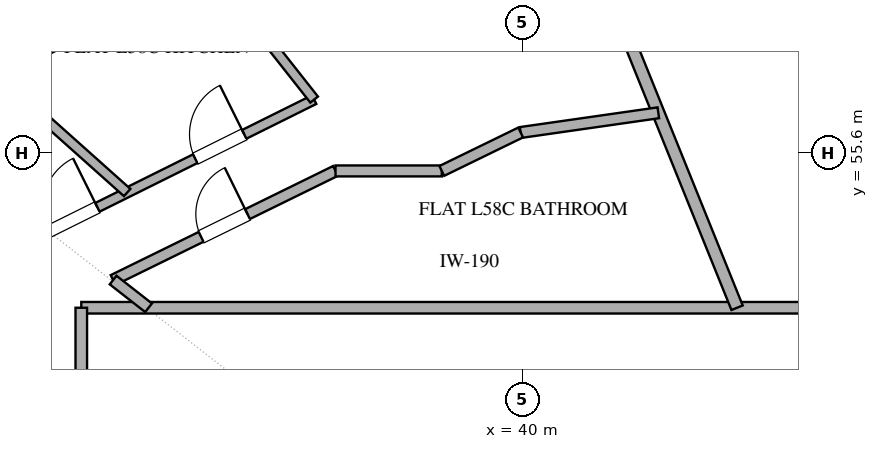
"""IFC4 building model, lengths in metres.
Left out: names, types, materials, properties, quantities, classifications, styles, units other than length and angle.
Written with IfcOpenShell. Run it as: python <this file> out.ifc"""

import sys

from ifc_helpers import new_model, si_unit, direction, frame, frame_2d, origin, place, context, subcontext, project, spatial, rectangle, extrude, element, fill, save


model = new_model("IFC4")
c1 = context("Model", 3, precision=1e-05, world=origin(), true_north=direction((0.0, 1.0)))
c2 = subcontext(c1, "Body", "Model", "MODEL_VIEW")
j1 = project(units=[si_unit("LENGTHUNIT", "METRE"), si_unit("PLANEANGLEUNIT", "RADIAN")], contexts=[c1])
p1 = place(None, origin())
s1 = spatial("IfcSite", under=j1, at=p1, CompositionType="ELEMENT")
p2 = place(p1, origin())
s2 = spatial("IfcBuilding", under=s1, at=p2, CompositionType="ELEMENT")
p3 = place(p2, frame((0.0, 0.0, 228.0)))
s3 = spatial("IfcBuildingStorey", under=s2, at=p3, CompositionType="ELEMENT", Elevation=228.0)
p4 = place(p3, frame((32.75, 53.05, 0.0), z_axis=(0.0, 0.0, 1.0), x_axis=(1.0, 0.0, 0.0)))
e1 = element("IfcWall", 1, at=p4, inside=s3, PredefinedType="PARTITIONING", context=c2, shape_type="SweptSolid", body=[
    extrude(rectangle(XDim=12.766, YDim=0.19, at=frame_2d((6.383, 0.0))), origin(), (0.0, 0.0, 1.0), 2.72),
])
p5 = place(p3, frame((32.75, 42.243, 0.0), z_axis=(0.0, 0.0, 1.0), x_axis=(0.0, 1.0, 0.0)))
e2 = element("IfcWall", 2, at=p5, inside=s3, PredefinedType="PARTITIONING", context=c2, shape_type="SweptSolid", body=[
    extrude(rectangle(XDim=10.807, YDim=0.19, at=frame_2d((5.404, 0.0))), origin(), (0.0, 0.0, 1.0), 2.72),
])
p6 = place(p5, frame((5.837, 0.0, 0.0)))
e3 = element("IfcOpeningElement", 3, at=p6, cuts=e2, PredefinedType="OPENING", context=c2, shape_type="SweptSolid", body=[
    extrude(rectangle(XDim=1.0, YDim=2.2, at=frame_2d((0.5, 1.1))), frame((0.0, 0.105, 0.0), z_axis=(0.0, -1.0, 0.0), x_axis=(1.0, 0.0, 0.0)), (0.0, 0.0, 1.0), 0.21),
])
p7 = place(p3, frame((33.273, 53.506, 0.0), z_axis=(0.0, 0.0, 1.0), x_axis=(0.89778136281, 0.440441397454, 0.0)))
e4 = element("IfcWall", 4, at=p7, inside=s3, PredefinedType="PLUMBINGWALL", context=c2, shape_type="SweptSolid", body=[
    extrude(rectangle(XDim=4.074, YDim=0.18, at=frame_2d((2.037, 0.0))), origin(), (0.0, 0.0, 1.0), 2.72),
])
p8 = place(p7, frame((1.612, 0.0, 0.0)))
e5 = element("IfcOpeningElement", 5, at=p8, cuts=e4, PredefinedType="OPENING", context=c2, shape_type="SweptSolid", body=[
    extrude(rectangle(XDim=0.85, YDim=2.1, at=frame_2d((0.425, 1.05))), frame((0.0, 0.1, 0.0), z_axis=(0.0, -1.0, 0.0), x_axis=(1.0, 0.0, 0.0)), (0.0, 0.0, 1.0), 0.2),
])
p9 = place(p3, frame((31.689, 54.042, 0.0), z_axis=(0.0, 0.0, 1.0), x_axis=(0.895479575413, 0.445102606168, 0.0)))
e6 = element("IfcWall", 6, at=p9, inside=s3, PredefinedType="PLUMBINGWALL", context=c2, shape_type="SweptSolid", body=[
    extrude(rectangle(XDim=5.462, YDim=0.16, at=frame_2d((2.731, 0.0))), origin(), (0.0, 0.0, 1.0), 2.72),
])
p10 = place(p9, frame((3.278, 0.0, 0.0)))
e7 = element("IfcOpeningElement", 7, at=p10, cuts=e6, PredefinedType="OPENING", context=c2, shape_type="SweptSolid", body=[
    extrude(rectangle(XDim=0.9, YDim=2.1, at=frame_2d((0.45, 1.05))), frame((0.0, 0.09, 0.0), z_axis=(0.0, -1.0, 0.0), x_axis=(1.0, 0.0, 0.0)), (0.0, 0.0, 1.0), 0.18),
])
p11 = place(p9, frame((0.581, 0.0, 0.0)))
e8 = element("IfcOpeningElement", 8, at=p11, cuts=e6, PredefinedType="OPENING", context=c2, shape_type="SweptSolid", body=[
    extrude(rectangle(XDim=0.9, YDim=2.1, at=frame_2d((0.45, 1.05))), frame((0.0, 0.09, 0.0), z_axis=(0.0, -1.0, 0.0), x_axis=(1.0, 0.0, 0.0)), (0.0, 0.0, 1.0), 0.18),
])
p12 = place(p3, frame((41.674, 57.657, 0.0), z_axis=(0.0, 0.0, 1.0), x_axis=(0.374573524941, -0.927197214412, 0.0)))
e9 = element("IfcWall", 9, at=p12, inside=s3, PredefinedType="PARTITIONING", context=c2, shape_type="SweptSolid", body=[
    extrude(rectangle(XDim=4.969, YDim=0.2, at=frame_2d((2.485, 0.0))), origin(), (0.0, 0.0, 1.0), 2.72),
])
p13 = place(p3, frame((33.505, 54.945, 0.0), z_axis=(0.0, 0.0, 1.0), x_axis=(-0.745914664094, 0.66604152565, 0.0)))
e10 = element("IfcWall", 10, at=p13, inside=s3, PredefinedType="PLUMBINGWALL", context=c2, shape_type="SweptSolid", body=[
    extrude(rectangle(XDim=3.014, YDim=0.16, at=frame_2d((1.507, 0.0))), origin(), (0.0, 0.0, 1.0), 2.72),
])
p14 = place(p3, frame((36.58, 56.473, 0.0), z_axis=(0.0, 0.0, 1.0), x_axis=(-0.619378047354, 0.785092882694, 0.0)))
e11 = element("IfcWall", 11, at=p14, inside=s3, PredefinedType="PLUMBINGWALL", context=c2, shape_type="SweptSolid", body=[
    extrude(rectangle(XDim=2.914, YDim=0.16, at=frame_2d((1.457, 0.0))), origin(), (0.0, 0.0, 1.0), 2.72),
])
p15 = place(p3, frame((39.976, 55.932, 0.0), z_axis=(0.0, 0.0, 1.0), x_axis=(0.989917445937, 0.141645509032, 0.0)))
e12 = element("IfcWall", 12, at=p15, inside=s3, PredefinedType="PLUMBINGWALL", context=c2, shape_type="SweptSolid", body=[
    extrude(rectangle(XDim=2.287, YDim=0.18, at=frame_2d((1.144, 0.0))), origin(), (0.0, 0.0, 1.0), 2.72),
])
p16 = place(p3, frame((36.931, 55.3, 0.0), z_axis=(0.0, 0.0, 1.0), x_axis=(1.0, 0.0, 0.0)))
e13 = element("IfcWall", 13, at=p16, inside=s3, PredefinedType="PLUMBINGWALL", context=c2, shape_type="SweptSolid", body=[
    extrude(rectangle(XDim=1.748, YDim=0.18, at=frame_2d((0.874, 0.0))), origin(), (0.0, 0.0, 1.0), 2.72),
])
p17 = place(p3, frame((38.679, 55.3, 0.0), z_axis=(0.0, 0.0, 1.0), x_axis=(0.898916394035, 0.438120207861, 0.0)))
e14 = element("IfcWall", 14, at=p17, inside=s3, PredefinedType="PLUMBINGWALL", context=c2, shape_type="SweptSolid", body=[
    extrude(rectangle(XDim=1.443, YDim=0.18, at=frame_2d((0.721, 0.0))), origin(), (0.0, 0.0, 1.0), 2.72),
])
p18 = place(p3, frame((33.857, 53.05, 0.0), z_axis=(0.0, 0.0, 1.0), x_axis=(-0.788214334349, 0.615400815019, 0.0)))
e15 = element("IfcWall", 15, at=p18, inside=s3, PredefinedType="PLUMBINGWALL", context=c2, shape_type="SweptSolid", body=[
    extrude(rectangle(XDim=0.74, YDim=0.18, at=frame_2d((0.37, 0.0))), origin(), (0.0, 0.0, 1.0), 2.72),
])
p19 = place(p8, origin())
e16 = element("IfcDoor", 16, at=p19, inside=s3, OperationType="SINGLE_SWING_RIGHT", PredefinedType="DOOR", context=c2, shape_type="SweptSolid", body=[
    extrude(rectangle(XDim=0.85, YDim=2.1, at=frame_2d((0.425, 1.05))), frame((0.0, 0.025, 0.0), z_axis=(0.0, -1.0, 0.0), x_axis=(1.0, 0.0, 0.0)), (0.0, 0.0, 1.0), 0.05),
])
fill(e5, e16)
p20 = place(p10, origin())
e17 = element("IfcDoor", 17, at=p20, inside=s3, OperationType="SINGLE_SWING_RIGHT", PredefinedType="DOOR", context=c2, shape_type="SweptSolid", body=[
    extrude(rectangle(XDim=0.9, YDim=2.1, at=frame_2d((0.45, 1.05))), frame((0.0, 0.025, 0.0), z_axis=(0.0, -1.0, 0.0), x_axis=(1.0, 0.0, 0.0)), (0.0, 0.0, 1.0), 0.05),
])
fill(e7, e17)
p21 = place(p11, origin())
e18 = element("IfcDoor", 18, at=p21, inside=s3, OperationType="SINGLE_SWING_RIGHT", PredefinedType="DOOR", context=c2, shape_type="SweptSolid", body=[
    extrude(rectangle(XDim=0.9, YDim=2.1, at=frame_2d((0.45, 1.05))), frame((0.0, 0.025, 0.0), z_axis=(0.0, -1.0, 0.0), x_axis=(1.0, 0.0, 0.0)), (0.0, 0.0, 1.0), 0.05),
])
fill(e8, e18)
save(model, sys.argv[1])
